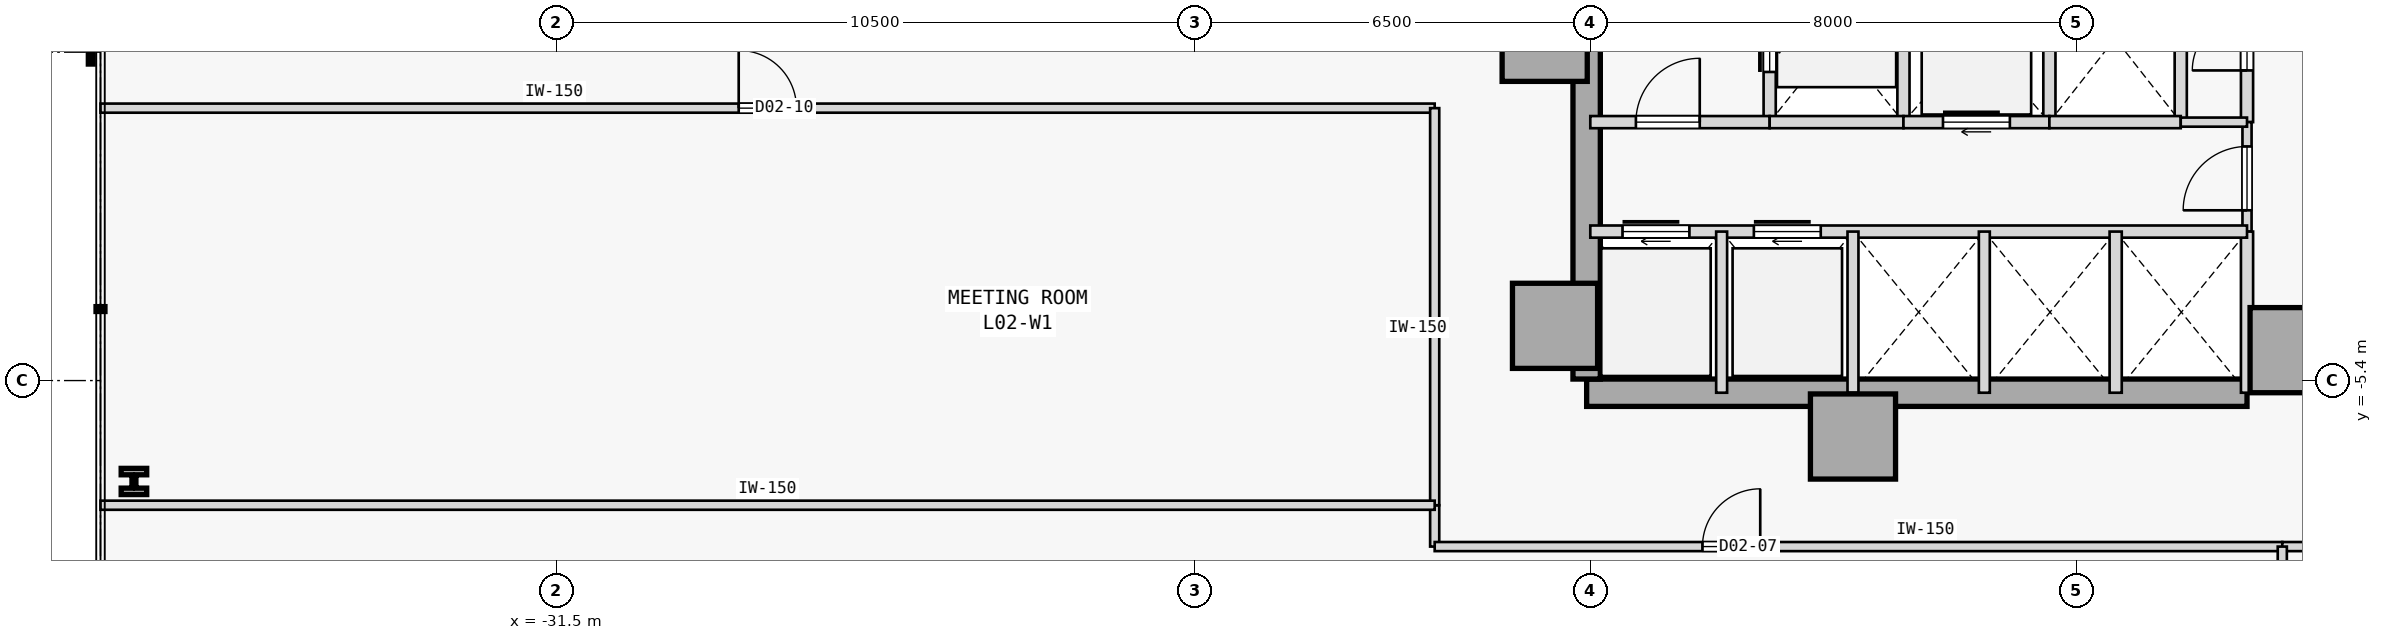
"""IFC4 building model, lengths in metres.
Left out: names, types, materials, properties, quantities, classifications, styles, units other than length and angle.
Written with IfcOpenShell. Run it as: python <this file> out.ifc"""

import sys

from ifc_helpers import new_model, si_unit, direction, frame, frame_2d, origin, origin_2d, place, context, subcontext, project, spatial, rectangle, i_section, extrude, element, fill, save


model = new_model("IFC4")
c1 = context("Model", 3, precision=1e-05, world=origin(), true_north=direction((0.0, 1.0)))
c2 = subcontext(c1, "Body", "Model", "MODEL_VIEW")
j1 = project(units=[si_unit("LENGTHUNIT", "METRE"), si_unit("PLANEANGLEUNIT", "RADIAN")], contexts=[c1])
p1 = place(None, origin())
s1 = spatial("IfcSite", under=j1, at=p1, CompositionType="ELEMENT")
p2 = place(p1, origin())
s2 = spatial("IfcBuilding", under=s1, at=p2, CompositionType="ELEMENT")
p3 = place(p2, frame((0.0, 0.0, 14.2)))
s3 = spatial("IfcBuildingStorey", under=s2, at=p3, CompositionType="ELEMENT", Elevation=14.2)
for number, where, z_axis, x_axis in (
    (1, (-15.25, 0.22, 0.0), (0.0, 0.0, 1.0), (1.0, 0.0, 0.0)),
    (2, (-15.08, -4.5, 0.0), (0.0, 0.0, 1.0), (1.0, 0.0, 0.0)),
    (3, (-10.18, -6.32, 0.0), (0.0, 0.0, 1.0), (1.0, 0.0, 0.0)),
    (4, (-2.95, -4.9, 0.0), (0.0, 0.0, 1.0), (1.0, 0.0, 0.0)),
):
    element("IfcColumn", number, at=place(p3, frame(where, z_axis=z_axis, x_axis=x_axis)), inside=s3, PredefinedType="COLUMN", context=c2, shape_type="SweptSolid", body=[
        extrude(rectangle(XDim=1.4, YDim=1.4, at=origin_2d()), origin(), (0.0, 0.0, 1.0), 3.8),
    ])
p4 = place(p3, frame((-14.56, -5.6, 0.0), z_axis=(0.0, 0.0, 1.0), x_axis=(1.0, 0.0, 0.0)))
e5 = element("IfcWall", 5, at=p4, inside=s3, PredefinedType="SHEAR", context=c2, shape_type="SweptSolid", body=[
    extrude(rectangle(XDim=10.86, YDim=0.45, at=frame_2d((5.43, 0.0))), origin(), (0.0, 0.0, 1.0), 3.575),
])
p5 = place(p3, frame((-14.56, -5.375, 0.0), z_axis=(0.0, 0.0, 1.0), x_axis=(0.0, 1.0, 0.0)))
e6 = element("IfcWall", 6, at=p5, inside=s3, PredefinedType="SHEAR", context=c2, shape_type="SweptSolid", body=[
    extrude(rectangle(XDim=10.75, YDim=0.45, at=frame_2d((5.375, 0.0))), origin(), (0.0, 0.0, 1.0), 3.575),
])
p6 = place(p3, frame((-38.45, -7.059, 0.0), z_axis=(0.0, 0.0, 1.0), x_axis=(1.0, 0.0, 0.0)))
e7 = element("IfcColumn", 7, at=p6, inside=s3, PredefinedType="COLUMN", context=c2, shape_type="SweptSolid", body=[
    extrude(i_section(OverallWidth=0.42, OverallDepth=0.431, WebThickness=0.065, FlangeThickness=0.106, FilletRadius=0.015, at=origin_2d()), origin(), (0.0, 0.0, 1.0), 3.8),
])
p7 = place(p3, frame((-3.7, -1.15, 0.0), z_axis=(0.0, 0.0, 1.0), x_axis=(0.0, 1.0, 0.0)))
e8 = element("IfcWall", 8, at=p7, inside=s3, PredefinedType="STANDARD", context=c2, shape_type="SweptSolid", body=[
    extrude(rectangle(XDim=6.75, YDim=0.2, at=frame_2d((3.375, 0.0))), origin(), (0.0, 0.0, 1.0), 3.575),
])
p8 = place(p7, frame((3.6, 0.0, 0.0)))
e9 = element("IfcOpeningElement", 9, at=p8, cuts=e8, PredefinedType="OPENING", context=c2, shape_type="SweptSolid", body=[
    extrude(rectangle(XDim=0.92, YDim=2.15, at=frame_2d((0.46, 1.075))), frame((0.0, 0.11, 0.0), z_axis=(0.0, -1.0, 0.0), x_axis=(1.0, 0.0, 0.0)), (0.0, 0.0, 1.0), 0.22),
])
p9 = place(p7, frame((0.85, 0.0, 0.0)))
e10 = element("IfcOpeningElement", 10, at=p9, cuts=e8, PredefinedType="OPENING", context=c2, shape_type="SweptSolid", body=[
    extrude(rectangle(XDim=0.9, YDim=2.15, at=frame_2d((0.45, 1.075))), frame((0.0, 0.11, 0.0), z_axis=(0.0, -1.0, 0.0), x_axis=(1.0, 0.0, 0.0)), (0.0, 0.0, 1.0), 0.22),
])
p10 = place(p3, frame((-3.7, -2.95, 0.0), z_axis=(0.0, 0.0, 1.0), x_axis=(0.0, 1.0, 0.0)))
e11 = element("IfcWall", 11, at=p10, inside=s3, PredefinedType="PARTITIONING", context=c2, shape_type="SweptSolid", body=[
    extrude(rectangle(XDim=1.8, YDim=0.15, at=frame_2d((0.9, 0.0))), origin(), (0.0, 0.0, 1.0), 3.575),
])
p11 = place(p10, frame((0.35, 0.0, 0.0)))
e12 = element("IfcOpeningElement", 12, at=p11, cuts=e11, PredefinedType="OPENING", context=c2, shape_type="SweptSolid", body=[
    extrude(rectangle(XDim=1.05, YDim=2.18, at=frame_2d((0.525, 1.09))), frame((0.0, 0.085, 0.0), z_axis=(0.0, -1.0, 0.0), x_axis=(1.0, 0.0, 0.0)), (0.0, 0.0, 1.0), 0.17),
])
p12 = place(p3, frame((-3.7, -5.6, 0.0), z_axis=(0.0, 0.0, 1.0), x_axis=(0.0, 1.0, 0.0)))
e13 = element("IfcWall", 13, at=p12, inside=s3, PredefinedType="STANDARD", context=c2, shape_type="SweptSolid", body=[
    extrude(rectangle(XDim=2.65, YDim=0.2, at=frame_2d((1.325, 0.0))), origin(), (0.0, 0.0, 1.0), 3.575),
])
p13 = place(p3, frame((-11.55, -1.15, 0.0), z_axis=(0.0, 0.0, 1.0), x_axis=(0.0, 1.0, 0.0)))
e14 = element("IfcWall", 14, at=p13, inside=s3, PredefinedType="STANDARD", context=c2, shape_type="SweptSolid", body=[
    extrude(rectangle(XDim=2.75, YDim=0.2, at=frame_2d((1.375, 0.0))), origin(), (0.0, 0.0, 1.0), 3.575),
])
p14 = place(p13, frame((0.825, 0.0, 0.0)))
e15 = element("IfcOpeningElement", 15, at=p14, cuts=e14, PredefinedType="OPENING", context=c2, shape_type="SweptSolid", body=[
    extrude(rectangle(XDim=1.1, YDim=2.15, at=frame_2d((0.55, 1.075))), frame((0.0, 0.11, 0.0), z_axis=(0.0, -1.0, 0.0), x_axis=(1.0, 0.0, 0.0)), (0.0, 0.0, 1.0), 0.22),
])
p15 = place(p3, frame((-9.35, -1.15, 0.0), z_axis=(0.0, 0.0, 1.0), x_axis=(0.0, 1.0, 0.0)))
e16 = element("IfcWall", 16, at=p15, inside=s3, PredefinedType="STANDARD", context=c2, shape_type="SweptSolid", body=[
    extrude(rectangle(XDim=2.75, YDim=0.2, at=frame_2d((1.375, 0.0))), origin(), (0.0, 0.0, 1.0), 3.575),
])
p16 = place(p3, frame((-14.5, -1.15, 0.0), z_axis=(0.0, 0.0, 1.0), x_axis=(1.0, 0.0, 0.0)))
e17 = element("IfcWall", 17, at=p16, inside=s3, PredefinedType="STANDARD", context=c2, shape_type="SweptSolid", body=[
    extrude(rectangle(XDim=2.95, YDim=0.2, at=frame_2d((1.475, 0.0))), origin(), (0.0, 0.0, 1.0), 3.575),
])
p17 = place(p16, frame((0.75, 0.0, 0.0)))
e18 = element("IfcOpeningElement", 18, at=p17, cuts=e17, PredefinedType="OPENING", context=c2, shape_type="SweptSolid", body=[
    extrude(rectangle(XDim=1.05, YDim=2.18, at=frame_2d((0.525, 1.09))), frame((0.0, 0.11, 0.0), z_axis=(0.0, -1.0, 0.0), x_axis=(1.0, 0.0, 0.0)), (0.0, 0.0, 1.0), 0.22),
])
p18 = place(p3, frame((-11.55, -1.15, 0.0), z_axis=(0.0, 0.0, 1.0), x_axis=(1.0, 0.0, 0.0)))
e19 = element("IfcWall", 19, at=p18, inside=s3, PredefinedType="STANDARD", context=c2, shape_type="SweptSolid", body=[
    extrude(rectangle(XDim=2.2, YDim=0.2, at=frame_2d((1.1, 0.0))), origin(), (0.0, 0.0, 1.0), 3.575),
])
p19 = place(p3, frame((-6.95, -1.15, 0.0), z_axis=(0.0, 0.0, 1.0), x_axis=(0.0, 1.0, 0.0)))
e20 = element("IfcWall", 20, at=p19, inside=s3, PredefinedType="STANDARD", context=c2, shape_type="SweptSolid", body=[
    extrude(rectangle(XDim=2.75, YDim=0.2, at=frame_2d((1.375, 0.0))), origin(), (0.0, 0.0, 1.0), 3.575),
])
p20 = place(p3, frame((-9.35, -1.15, 0.0), z_axis=(0.0, 0.0, 1.0), x_axis=(1.0, 0.0, 0.0)))
e21 = element("IfcWall", 21, at=p20, inside=s3, PredefinedType="STANDARD", context=c2, shape_type="SweptSolid", body=[
    extrude(rectangle(XDim=2.4, YDim=0.2, at=frame_2d((1.2, 0.0))), origin(), (0.0, 0.0, 1.0), 3.575),
])
p21 = place(p20, frame((0.65, 0.0, 0.0)))
e22 = element("IfcOpeningElement", 22, at=p21, cuts=e21, PredefinedType="OPENING", context=c2, shape_type="SweptSolid", body=[
    extrude(rectangle(XDim=1.1, YDim=2.15, at=frame_2d((0.55, 1.075))), frame((0.0, 0.11, 0.0), z_axis=(0.0, -1.0, 0.0), x_axis=(1.0, 0.0, 0.0)), (0.0, 0.0, 1.0), 0.22),
])
p22 = place(p3, frame((-4.79, -1.15, 0.0), z_axis=(0.0, 0.0, 1.0), x_axis=(0.0, 1.0, 0.0)))
e23 = element("IfcWall", 23, at=p22, inside=s3, PredefinedType="STANDARD", context=c2, shape_type="SweptSolid", body=[
    extrude(rectangle(XDim=2.75, YDim=0.2, at=frame_2d((1.375, 0.0))), origin(), (0.0, 0.0, 1.0), 3.575),
])
p23 = place(p3, frame((-6.95, -1.15, 0.0), z_axis=(0.0, 0.0, 1.0), x_axis=(1.0, 0.0, 0.0)))
e24 = element("IfcWall", 24, at=p23, inside=s3, PredefinedType="STANDARD", context=c2, shape_type="SweptSolid", body=[
    extrude(rectangle(XDim=2.16, YDim=0.2, at=frame_2d((1.08, 0.0))), origin(), (0.0, 0.0, 1.0), 3.575),
])
p24 = place(p3, frame((-4.79, -1.15, 0.0), z_axis=(0.0, 0.0, 1.0), x_axis=(1.0, 0.0, 0.0)))
e25 = element("IfcWall", 25, at=p24, inside=s3, PredefinedType="PARTITIONING", context=c2, shape_type="SweptSolid", body=[
    extrude(rectangle(XDim=1.09, YDim=0.15, at=frame_2d((0.545, 0.0))), origin(), (0.0, 0.0, 1.0), 3.575),
])
p25 = place(p3, frame((-14.5, -2.95, 0.0), z_axis=(0.0, 0.0, 1.0), x_axis=(1.0, 0.0, 0.0)))
e26 = element("IfcWall", 26, at=p25, inside=s3, PredefinedType="STANDARD", context=c2, shape_type="SweptSolid", body=[
    extrude(rectangle(XDim=10.8, YDim=0.2, at=frame_2d((5.4, 0.0))), origin(), (0.0, 0.0, 1.0), 3.575),
])
p26 = place(p25, frame((0.53, 0.0, 0.0)))
e27 = element("IfcOpeningElement", 27, at=p26, cuts=e26, PredefinedType="OPENING", context=c2, shape_type="SweptSolid", body=[
    extrude(rectangle(XDim=1.1, YDim=2.15, at=frame_2d((0.55, 1.075))), frame((0.0, 0.11, 0.0), z_axis=(0.0, -1.0, 0.0), x_axis=(1.0, 0.0, 0.0)), (0.0, 0.0, 1.0), 0.22),
])
p27 = place(p25, frame((2.69, 0.0, 0.0)))
e28 = element("IfcOpeningElement", 28, at=p27, cuts=e26, PredefinedType="OPENING", context=c2, shape_type="SweptSolid", body=[
    extrude(rectangle(XDim=1.1, YDim=2.15, at=frame_2d((0.55, 1.075))), frame((0.0, 0.11, 0.0), z_axis=(0.0, -1.0, 0.0), x_axis=(1.0, 0.0, 0.0)), (0.0, 0.0, 1.0), 0.22),
])
p28 = place(p3, frame((-5.86, -5.6, 0.0), z_axis=(0.0, 0.0, 1.0), x_axis=(0.0, 1.0, 0.0)))
e29 = element("IfcWall", 29, at=p28, inside=s3, PredefinedType="STANDARD", context=c2, shape_type="SweptSolid", body=[
    extrude(rectangle(XDim=2.65, YDim=0.2, at=frame_2d((1.325, 0.0))), origin(), (0.0, 0.0, 1.0), 3.575),
])
for number, where, z_axis, x_axis in (
    (30, (-12.34, -5.6, 0.0), (0.0, 0.0, 1.0), (0.0, 1.0, 0.0)),
    (31, (-10.18, -5.6, 0.0), (0.0, 0.0, 1.0), (0.0, 1.0, 0.0)),
    (32, (-8.02, -5.6, 0.0), (0.0, 0.0, 1.0), (0.0, 1.0, 0.0)),
):
    element("IfcWall", number, at=place(p3, frame(where, z_axis=z_axis, x_axis=x_axis)), inside=s3, PredefinedType="STANDARD", context=c2, shape_type="SweptSolid", body=[
        extrude(rectangle(XDim=2.65, YDim=0.18, at=frame_2d((1.325, 0.0))), origin(), (0.0, 0.0, 1.0), 3.575),
    ])
p29 = place(p3, frame((-17.059, -8.13, 0.0), z_axis=(0.0, 0.0, 1.0), x_axis=(0.0, 1.0, 0.0)))
e33 = element("IfcWall", 33, at=p29, inside=s3, PredefinedType="PARTITIONING", context=c2, shape_type="SweptSolid", body=[
    extrude(rectangle(XDim=0.68, YDim=0.15, at=frame_2d((0.34, 0.0))), origin(), (0.0, 0.0, 1.0), 3.575),
])
p30 = place(p3, frame((-17.059, -8.13, 0.0), z_axis=(0.0, 0.0, 1.0), x_axis=(1.0, 0.0, 0.0)))
e34 = element("IfcWall", 34, at=p30, inside=s3, PredefinedType="PARTITIONING", context=c2, shape_type="SweptSolid", body=[
    extrude(rectangle(XDim=13.939, YDim=0.15, at=frame_2d((6.969, 0.0))), origin(), (0.0, 0.0, 1.0), 3.575),
])
p31 = place(p30, frame((4.404, 0.0, 0.0)))
e35 = element("IfcOpeningElement", 35, at=p31, cuts=e34, PredefinedType="OPENING", context=c2, shape_type="SweptSolid", body=[
    extrude(rectangle(XDim=0.95, YDim=2.15, at=frame_2d((0.475, 1.075))), frame((0.0, 0.085, 0.0), z_axis=(0.0, -1.0, 0.0), x_axis=(1.0, 0.0, 0.0)), (0.0, 0.0, 1.0), 0.17),
])
p32 = place(p3, frame((-3.12, -8.13, 0.0), z_axis=(0.0, 0.0, 1.0), x_axis=(1.0, 0.0, 0.0)))
e36 = element("IfcWall", 36, at=p32, inside=s3, PredefinedType="PARTITIONING", context=c2, shape_type="SweptSolid", body=[
    extrude(rectangle(XDim=2.2, YDim=0.15, at=frame_2d((1.1, 0.0))), origin(), (0.0, 0.0, 1.0), 3.575),
])
p33 = place(p3, frame((-39.0, -0.92, 0.0), z_axis=(0.0, 0.0, 1.0), x_axis=(1.0, 0.0, 0.0)))
e37 = element("IfcWall", 37, at=p33, inside=s3, PredefinedType="PARTITIONING", context=c2, shape_type="SweptSolid", body=[
    extrude(rectangle(XDim=21.941, YDim=0.15, at=frame_2d((10.97, 0.0))), origin(), (0.0, 0.0, 1.0), 3.575),
])
p34 = place(p33, frame((10.496, 0.0, 0.0)))
e38 = element("IfcOpeningElement", 38, at=p34, cuts=e37, PredefinedType="OPENING", context=c2, shape_type="SweptSolid", body=[
    extrude(rectangle(XDim=0.95, YDim=2.15, at=frame_2d((0.475, 1.075))), frame((0.0, 0.085, 0.0), z_axis=(0.0, -1.0, 0.0), x_axis=(1.0, 0.0, 0.0)), (0.0, 0.0, 1.0), 0.17),
])
p35 = place(p3, frame((-17.059, -7.45, 0.0), z_axis=(0.0, 0.0, 1.0), x_axis=(0.0, 1.0, 0.0)))
e39 = element("IfcWall", 39, at=p35, inside=s3, PredefinedType="PARTITIONING", context=c2, shape_type="SweptSolid", body=[
    extrude(rectangle(XDim=6.53, YDim=0.15, at=frame_2d((3.265, 0.0))), origin(), (0.0, 0.0, 1.0), 3.575),
])
p36 = place(p3, frame((-3.12, -25.0, 0.0), z_axis=(0.0, 0.0, 1.0), x_axis=(0.0, 1.0, 0.0)))
e40 = element("IfcWall", 40, at=p36, inside=s3, PredefinedType="PARTITIONING", context=c2, shape_type="SweptSolid", body=[
    extrude(rectangle(XDim=16.87, YDim=0.15, at=frame_2d((8.435, 0.0))), origin(), (0.0, 0.0, 1.0), 3.575),
])
p37 = place(p3, frame((-39.0, -7.45, 0.0), z_axis=(0.0, 0.0, 1.0), x_axis=(1.0, 0.0, 0.0)))
e41 = element("IfcWall", 41, at=p37, inside=s3, PredefinedType="PARTITIONING", context=c2, shape_type="SweptSolid", body=[
    extrude(rectangle(XDim=21.941, YDim=0.15, at=frame_2d((10.97, 0.0))), origin(), (0.0, 0.0, 1.0), 3.575),
])
p38 = place(p17, origin())
e42 = element("IfcDoor", 42, at=p38, inside=s3, OperationType="SINGLE_SWING_RIGHT", PredefinedType="DOOR", context=c2, shape_type="SweptSolid", body=[
    extrude(rectangle(XDim=1.05, YDim=2.18, at=frame_2d((0.525, 1.09))), frame((0.0, 0.025, 0.0), z_axis=(0.0, -1.0, 0.0), x_axis=(1.0, 0.0, 0.0)), (0.0, 0.0, 1.0), 0.05),
])
fill(e18, e42)
p39 = place(p11, origin())
e43 = element("IfcDoor", 43, at=p39, inside=s3, OperationType="SINGLE_SWING_LEFT", PredefinedType="DOOR", context=c2, shape_type="SweptSolid", body=[
    extrude(rectangle(XDim=1.05, YDim=2.18, at=frame_2d((0.525, 1.09))), frame((0.0, 0.025, 0.0), z_axis=(0.0, -1.0, 0.0), x_axis=(1.0, 0.0, 0.0)), (0.0, 0.0, 1.0), 0.05),
])
fill(e12, e43)
p40 = place(p14, origin())
e44 = element("IfcDoor", 44, at=p40, inside=s3, OperationType="SLIDING_TO_RIGHT", PredefinedType="DOOR", context=c2, shape_type="SweptSolid", body=[
    extrude(rectangle(XDim=1.1, YDim=2.15, at=frame_2d((0.55, 1.075))), frame((0.0, 0.025, 0.0), z_axis=(0.0, -1.0, 0.0), x_axis=(1.0, 0.0, 0.0)), (0.0, 0.0, 1.0), 0.05),
])
fill(e15, e44)
p41 = place(p21, origin())
e45 = element("IfcDoor", 45, at=p41, inside=s3, OperationType="SLIDING_TO_RIGHT", PredefinedType="DOOR", context=c2, shape_type="SweptSolid", body=[
    extrude(rectangle(XDim=1.1, YDim=2.15, at=frame_2d((0.55, 1.075))), frame((0.0, 0.025, 0.0), z_axis=(0.0, -1.0, 0.0), x_axis=(1.0, 0.0, 0.0)), (0.0, 0.0, 1.0), 0.05),
])
fill(e22, e45)
p42 = place(p26, origin())
e46 = element("IfcDoor", 46, at=p42, inside=s3, OperationType="SLIDING_TO_RIGHT", PredefinedType="DOOR", context=c2, shape_type="SweptSolid", body=[
    extrude(rectangle(XDim=1.1, YDim=2.15, at=frame_2d((0.55, 1.075))), frame((0.0, 0.025, 0.0), z_axis=(0.0, -1.0, 0.0), x_axis=(1.0, 0.0, 0.0)), (0.0, 0.0, 1.0), 0.05),
])
fill(e27, e46)
p43 = place(p27, origin())
e47 = element("IfcDoor", 47, at=p43, inside=s3, OperationType="SLIDING_TO_RIGHT", PredefinedType="DOOR", context=c2, shape_type="SweptSolid", body=[
    extrude(rectangle(XDim=1.1, YDim=2.15, at=frame_2d((0.55, 1.075))), frame((0.0, 0.025, 0.0), z_axis=(0.0, -1.0, 0.0), x_axis=(1.0, 0.0, 0.0)), (0.0, 0.0, 1.0), 0.05),
])
fill(e28, e47)
p44 = place(p9, origin())
e48 = element("IfcDoor", 48, at=p44, inside=s3, OperationType="SINGLE_SWING_LEFT", PredefinedType="DOOR", context=c2, shape_type="SweptSolid", body=[
    extrude(rectangle(XDim=0.9, YDim=2.15, at=frame_2d((0.45, 1.075))), frame((0.0, 0.025, 0.0), z_axis=(0.0, -1.0, 0.0), x_axis=(1.0, 0.0, 0.0)), (0.0, 0.0, 1.0), 0.05),
])
fill(e10, e48)
p45 = place(p31, origin())
e49 = element("IfcDoor", 49, at=p45, inside=s3, OperationType="SINGLE_SWING_RIGHT", PredefinedType="DOOR", context=c2, shape_type="SweptSolid", body=[
    extrude(rectangle(XDim=0.95, YDim=2.15, at=frame_2d((0.475, 1.075))), frame((0.0, 0.025, 0.0), z_axis=(0.0, -1.0, 0.0), x_axis=(1.0, 0.0, 0.0)), (0.0, 0.0, 1.0), 0.05),
])
fill(e35, e49)
p46 = place(p34, origin())
e50 = element("IfcDoor", 50, at=p46, inside=s3, OperationType="SINGLE_SWING_LEFT", PredefinedType="DOOR", context=c2, shape_type="SweptSolid", body=[
    extrude(rectangle(XDim=0.95, YDim=2.15, at=frame_2d((0.475, 1.075))), frame((0.0, 0.025, 0.0), z_axis=(0.0, -1.0, 0.0), x_axis=(1.0, 0.0, 0.0)), (0.0, 0.0, 1.0), 0.05),
])
fill(e38, e50)
save(model, sys.argv[1])
